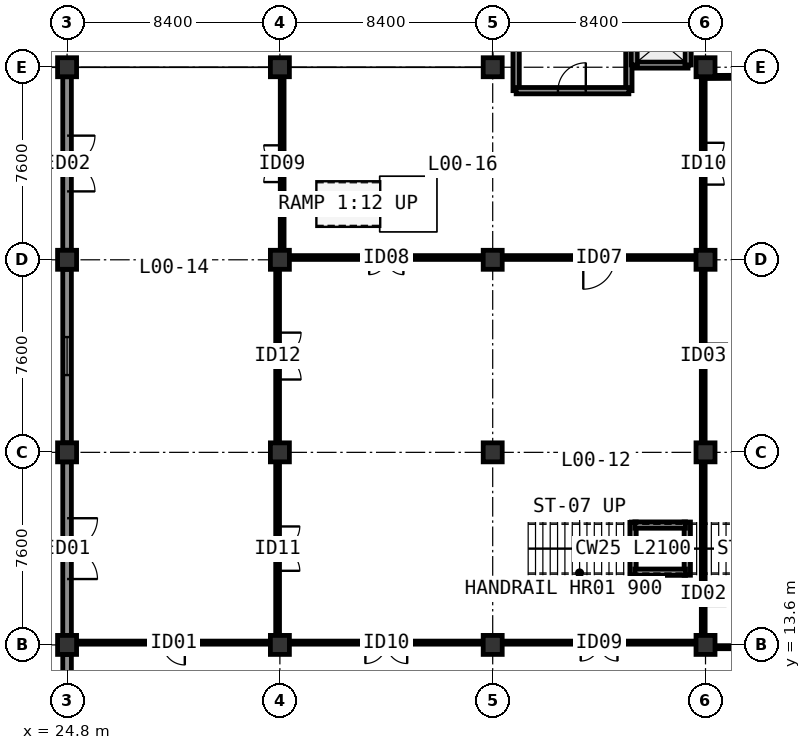
"""IFC4 building model, lengths in metres.
Left out: names, types, materials, properties, quantities, classifications, styles, units other than length and angle.
Written with IfcOpenShell. Run it as: python <this file> out.ifc"""

import sys

from ifc_helpers import new_model, si_unit, direction, frame, frame_2d, origin, origin_2d, place, context, subcontext, project, spatial, rectangle, extrude, element, fill, save


model = new_model("IFC4")
c1 = context("Model", 3, precision=1e-05, world=origin(), true_north=direction((0.0, 1.0)))
c2 = subcontext(c1, "Body", "Model", "MODEL_VIEW")
j1 = project(units=[si_unit("LENGTHUNIT", "METRE"), si_unit("PLANEANGLEUNIT", "RADIAN")], contexts=[c1])
p1 = place(None, origin())
s1 = spatial("IfcSite", under=j1, at=p1, CompositionType="ELEMENT")
p2 = place(p1, origin())
s2 = spatial("IfcBuilding", under=s1, at=p2, CompositionType="ELEMENT")
p3 = place(p2, origin())
s3 = spatial("IfcBuildingStorey", under=s2, at=p3, CompositionType="ELEMENT", Elevation=0.0)
for number, where, z_axis, x_axis in (
    (1, (24.8, 13.6, 0.0), (0.0, 0.0, 1.0), (1.0, 0.0, 0.0)),
    (2, (33.2, 13.6, 0.0), (0.0, 0.0, 1.0), (1.0, 0.0, 0.0)),
    (3, (41.6, 13.6, 0.0), (0.0, 0.0, 1.0), (1.0, 0.0, 0.0)),
    (4, (50.0, 13.6, 0.0), (0.0, 0.0, 1.0), (1.0, 0.0, 0.0)),
    (5, (24.8, 21.2, 0.0), (0.0, 0.0, 1.0), (1.0, 0.0, 0.0)),
    (6, (33.2, 21.2, 0.0), (0.0, 0.0, 1.0), (1.0, 0.0, 0.0)),
    (7, (41.6, 21.2, 0.0), (0.0, 0.0, 1.0), (1.0, 0.0, 0.0)),
    (8, (50.0, 21.2, 0.0), (0.0, 0.0, 1.0), (1.0, 0.0, 0.0)),
    (9, (24.8, 28.8, 0.0), (0.0, 0.0, 1.0), (1.0, 0.0, 0.0)),
    (10, (33.2, 28.8, 0.0), (0.0, 0.0, 1.0), (1.0, 0.0, 0.0)),
    (11, (41.6, 28.8, 0.0), (0.0, 0.0, 1.0), (1.0, 0.0, 0.0)),
    (12, (50.0, 28.8, 0.0), (0.0, 0.0, 1.0), (1.0, 0.0, 0.0)),
    (13, (24.8, 36.4, 0.0), (0.0, 0.0, 1.0), (1.0, 0.0, 0.0)),
    (14, (33.2, 36.4, 0.0), (0.0, 0.0, 1.0), (1.0, 0.0, 0.0)),
    (15, (41.6, 36.4, 0.0), (0.0, 0.0, 1.0), (1.0, 0.0, 0.0)),
    (16, (50.0, 36.4, 0.0), (0.0, 0.0, 1.0), (1.0, 0.0, 0.0)),
):
    element("IfcColumn", number, at=place(p3, frame(where, z_axis=z_axis, x_axis=x_axis)), inside=s3, PredefinedType="COLUMN", context=c2, shape_type="SweptSolid", body=[
        extrude(rectangle(XDim=0.75, YDim=0.75, at=origin_2d()), origin(), (0.0, 0.0, 1.0), 4.8),
    ])
p4 = place(p3, frame((24.8, 36.025, 0.0), z_axis=(0.0, 0.0, 1.0), x_axis=(0.0, -1.0, 0.0)))
e17 = element("IfcWall", 17, at=p4, inside=s3, PredefinedType="SOLIDWALL", context=c2, shape_type="SweptSolid", body=[
    extrude(rectangle(XDim=6.85, YDim=0.34, at=frame_2d((3.425, 0.0))), origin(), (0.0, 0.0, 1.0), 4.5),
])
p5 = place(p4, frame((2.325, 0.0, 0.0)))
e18 = element("IfcOpeningElement", 18, at=p5, cuts=e17, PredefinedType="OPENING", context=c2, shape_type="SweptSolid", body=[
    extrude(rectangle(XDim=2.2, YDim=2.4, at=frame_2d((1.1, 1.2))), frame((0.0, 0.18, 0.0), z_axis=(0.0, -1.0, 0.0), x_axis=(1.0, 0.0, 0.0)), (0.0, 0.0, 1.0), 0.36),
])
p6 = place(p3, frame((24.8, 28.425, 0.0), z_axis=(0.0, 0.0, 1.0), x_axis=(0.0, -1.0, 0.0)))
e19 = element("IfcWall", 19, at=p6, inside=s3, PredefinedType="SOLIDWALL", context=c2, shape_type="SweptSolid", body=[
    extrude(rectangle(XDim=6.85, YDim=0.34, at=frame_2d((3.425, 0.0))), origin(), (0.0, 0.0, 1.0), 4.5),
])
p7 = place(p6, frame((2.675, 0.0, 0.95)))
e20 = element("IfcOpeningElement", 20, at=p7, cuts=e19, PredefinedType="OPENING", context=c2, shape_type="SweptSolid", body=[
    extrude(rectangle(XDim=1.5, YDim=1.8, at=frame_2d((0.75, 0.9))), frame((0.0, 0.18, 0.0), z_axis=(0.0, -1.0, 0.0), x_axis=(1.0, 0.0, 0.0)), (0.0, 0.0, 1.0), 0.36),
])
p8 = place(p3, frame((24.8, 20.825, 0.0), z_axis=(0.0, 0.0, 1.0), x_axis=(0.0, -1.0, 0.0)))
e21 = element("IfcWall", 21, at=p8, inside=s3, PredefinedType="SOLIDWALL", context=c2, shape_type="SweptSolid", body=[
    extrude(rectangle(XDim=6.85, YDim=0.34, at=frame_2d((3.425, 0.0))), origin(), (0.0, 0.0, 1.0), 4.5),
])
p9 = place(p8, frame((2.225, 0.0, 0.0)))
e22 = element("IfcOpeningElement", 22, at=p9, cuts=e21, PredefinedType="OPENING", context=c2, shape_type="SweptSolid", body=[
    extrude(rectangle(XDim=2.4, YDim=2.4, at=frame_2d((1.2, 1.2))), frame((0.0, 0.18, 0.0), z_axis=(0.0, -1.0, 0.0), x_axis=(1.0, 0.0, 0.0)), (0.0, 0.0, 1.0), 0.36),
])
p10 = place(p3, frame((24.8, 13.225, 0.0), z_axis=(0.0, 0.0, 1.0), x_axis=(0.0, -1.0, 0.0)))
e23 = element("IfcWall", 23, at=p10, inside=s3, PredefinedType="SOLIDWALL", context=c2, shape_type="SweptSolid", body=[
    extrude(rectangle(XDim=6.775, YDim=0.34, at=frame_2d((3.388, 0.0))), origin(), (0.0, 0.0, 1.0), 4.5),
])
p11 = place(p10, frame((2.387, 0.0, 0.0)))
e24 = element("IfcOpeningElement", 24, at=p11, cuts=e23, PredefinedType="OPENING", context=c2, shape_type="SweptSolid", body=[
    extrude(rectangle(XDim=2.0, YDim=2.1, at=frame_2d((1.0, 1.05))), frame((0.0, 0.18, 0.0), z_axis=(0.0, -1.0, 0.0), x_axis=(1.0, 0.0, 0.0)), (0.0, 0.0, 1.0), 0.36),
])
for number, where, z_axis, x_axis in (
    (25, (42.525, 35.475, 0.0), (0.0, 0.0, 1.0), (0.0, 1.0, 0.0)),
    (26, (46.975, 35.475, 0.0), (0.0, 0.0, 1.0), (0.0, 1.0, 0.0)),
):
    element("IfcWall", number, at=place(p3, frame(where, z_axis=z_axis, x_axis=x_axis)), inside=s3, PredefinedType="SHEAR", context=c2, shape_type="SweptSolid", body=[
        extrude(rectangle(XDim=8.1, YDim=0.25, at=frame_2d((4.05, 0.0))), origin(), (0.0, 0.0, 1.0), 4.52),
    ])
p12 = place(p3, frame((42.525, 35.475, 0.0), z_axis=(0.0, 0.0, 1.0), x_axis=(1.0, 0.0, 0.0)))
e27 = element("IfcWall", 27, at=p12, inside=s3, PredefinedType="SHEAR", context=c2, shape_type="SweptSolid", body=[
    extrude(rectangle(XDim=4.45, YDim=0.25, at=frame_2d((2.225, 0.0))), origin(), (0.0, 0.0, 1.0), 4.52),
])
p13 = place(p12, frame((1.65, 0.0, 0.0)))
e28 = element("IfcOpeningElement", 28, at=p13, cuts=e27, PredefinedType="OPENING", context=c2, shape_type="SweptSolid", body=[
    extrude(rectangle(XDim=1.1, YDim=2.1, at=frame_2d((0.55, 1.05))), frame((0.0, 0.135, 0.0), z_axis=(0.0, -1.0, 0.0), x_axis=(1.0, 0.0, 0.0)), (0.0, 0.0, 1.0), 0.27),
])
p14 = place(p3, frame((47.19, 36.49, 0.0), z_axis=(0.0, 0.0, 1.0), x_axis=(1.0, 0.0, 0.0)))
e29 = element("IfcWall", 29, at=p14, inside=s3, PredefinedType="SHEAR", context=c2, shape_type="SweptSolid", body=[
    extrude(rectangle(XDim=2.12, YDim=0.25, at=frame_2d((1.06, 0.0))), origin(), (0.0, 0.0, 1.0), 4.52),
])
for number, where, z_axis, x_axis in (
    (30, (47.19, 36.49, 0.0), (0.0, 0.0, 1.0), (0.0, 1.0, 0.0)),
    (31, (49.31, 36.49, 0.0), (0.0, 0.0, 1.0), (0.0, 1.0, 0.0)),
):
    element("IfcWall", number, at=place(p3, frame(where, z_axis=z_axis, x_axis=x_axis)), inside=s3, PredefinedType="SHEAR", context=c2, shape_type="SweptSolid", body=[
        extrude(rectangle(XDim=1.82, YDim=0.25, at=frame_2d((0.91, 0.0))), origin(), (0.0, 0.0, 1.0), 4.52),
    ])
for number, where, z_axis, x_axis in (
    (32, (47.14, 16.35, 0.0), (0.0, 0.0, 1.0), (0.0, 1.0, 0.0)),
    (33, (49.28, 16.35, 0.0), (0.0, 0.0, 1.0), (0.0, 1.0, 0.0)),
):
    element("IfcWall", number, at=place(p3, frame(where, z_axis=z_axis, x_axis=x_axis)), inside=s3, PredefinedType="SHEAR", context=c2, shape_type="SweptSolid", body=[
        extrude(rectangle(XDim=2.1, YDim=0.25, at=frame_2d((1.05, 0.0))), origin(), (0.0, 0.0, 1.0), 2.21),
    ])
for number, where, z_axis, x_axis in (
    (34, (47.21, 16.47, 0.0), (0.0, 0.0, 1.0), (1.0, 0.0, 0.0)),
    (35, (47.21, 18.33, 0.0), (0.0, 0.0, 1.0), (1.0, 0.0, 0.0)),
):
    element("IfcWall", number, at=place(p3, frame(where, z_axis=z_axis, x_axis=x_axis)), inside=s3, PredefinedType="SHEAR", context=c2, shape_type="SweptSolid", body=[
        extrude(rectangle(XDim=2.0, YDim=0.25, at=frame_2d((1.0, 0.0))), origin(), (0.0, 0.0, 1.0), 2.21),
    ])
p15 = place(p3, frame((66.26, 36.09, 0.0), z_axis=(0.0, 0.0, 1.0), x_axis=(-0.999989479484, -0.004587038489, 0.0)))
e36 = element("IfcWall", 36, at=p15, inside=s3, PredefinedType="PARTITIONING", context=c2, shape_type="SweptSolid", body=[
    extrude(rectangle(XDim=16.18, YDim=0.12, at=frame_2d((8.09, 0.0))), origin(), (0.0, 0.0, 1.0), 4.5),
])
p16 = place(p15, frame((8.815, 0.0, 0.0)))
e37 = element("IfcOpeningElement", 37, at=p16, cuts=e36, PredefinedType="OPENING", context=c2, shape_type="SweptSolid", body=[
    extrude(rectangle(XDim=1.15, YDim=2.12, at=frame_2d((0.575, 1.06))), frame((0.0, 0.07, 0.0), z_axis=(0.0, -1.0, 0.0), x_axis=(1.0, 0.0, 0.0)), (0.0, 0.0, 1.0), 0.14),
])
p17 = place(p3, frame((33.29, 29.265, 0.0), z_axis=(0.0, 0.0, 1.0), x_axis=(0.0, 1.0, 0.0)))
e38 = element("IfcWall", 38, at=p17, inside=s3, PredefinedType="PARTITIONING", context=c2, shape_type="SweptSolid", body=[
    extrude(rectangle(XDim=6.655, YDim=0.15, at=frame_2d((3.328, 0.0))), origin(), (0.0, 0.0, 1.0), 4.5),
])
p18 = place(p17, frame((2.603, 0.0, 0.0)))
e39 = element("IfcOpeningElement", 39, at=p18, cuts=e38, PredefinedType="OPENING", context=c2, shape_type="SweptSolid", body=[
    extrude(rectangle(XDim=1.45, YDim=2.18, at=frame_2d((0.725, 1.09))), frame((0.0, 0.085, 0.0), z_axis=(0.0, -1.0, 0.0), x_axis=(1.0, 0.0, 0.0)), (0.0, 0.0, 1.0), 0.17),
])
p19 = place(p3, frame((49.91, 35.92, 0.0), z_axis=(0.0, 0.0, 1.0), x_axis=(-7.3370263e-05, -0.999999997308, 0.0)))
e40 = element("IfcWall", 40, at=p19, inside=s3, PredefinedType="PARTITIONING", context=c2, shape_type="SweptSolid", body=[
    extrude(rectangle(XDim=6.655, YDim=0.15, at=frame_2d((3.328, 0.0))), origin(), (0.0, 0.0, 1.0), 3.81),
])
p20 = place(p19, frame((2.502, 0.0, 0.0)))
e41 = element("IfcOpeningElement", 41, at=p20, cuts=e40, PredefinedType="OPENING", context=c2, shape_type="SweptSolid", body=[
    extrude(rectangle(XDim=1.65, YDim=2.18, at=frame_2d((0.825, 1.09))), frame((0.0, 0.085, 0.0), z_axis=(0.0, -1.0, 0.0), x_axis=(1.0, 0.0, 0.0)), (0.0, 0.0, 1.0), 0.17),
])
p21 = place(p3, frame((33.11, 20.735, 0.0), z_axis=(0.0, 0.0, 1.0), x_axis=(0.0, -1.0, 0.0)))
e42 = element("IfcWall", 42, at=p21, inside=s3, PredefinedType="PARTITIONING", context=c2, shape_type="SweptSolid", body=[
    extrude(rectangle(XDim=6.67, YDim=0.15, at=frame_2d((3.335, 0.0))), origin(), (0.0, 0.0, 1.0), 3.81),
])
p22 = place(p21, frame((2.46, 0.0, 0.0)))
e43 = element("IfcOpeningElement", 43, at=p22, cuts=e42, PredefinedType="OPENING", context=c2, shape_type="SweptSolid", body=[
    extrude(rectangle(XDim=1.75, YDim=2.22, at=frame_2d((0.875, 1.11))), frame((0.0, 0.085, 0.0), z_axis=(0.0, -1.0, 0.0), x_axis=(1.0, 0.0, 0.0)), (0.0, 0.0, 1.0), 0.17),
])
p23 = place(p3, frame((33.11, 28.335, 0.0), z_axis=(0.0, 0.0, 1.0), x_axis=(0.0, -1.0, 0.0)))
e44 = element("IfcWall", 44, at=p23, inside=s3, PredefinedType="PARTITIONING", context=c2, shape_type="SweptSolid", body=[
    extrude(rectangle(XDim=6.67, YDim=0.15, at=frame_2d((3.335, 0.0))), origin(), (0.0, 0.0, 1.0), 3.81),
])
p24 = place(p23, frame((2.41, 0.0, 0.0)))
e45 = element("IfcOpeningElement", 45, at=p24, cuts=e44, PredefinedType="OPENING", context=c2, shape_type="SweptSolid", body=[
    extrude(rectangle(XDim=1.85, YDim=2.22, at=frame_2d((0.925, 1.11))), frame((0.0, 0.085, 0.0), z_axis=(0.0, -1.0, 0.0), x_axis=(1.0, 0.0, 0.0)), (0.0, 0.0, 1.0), 0.17),
])
p25 = place(p3, frame((32.735, 13.69, 0.0), z_axis=(0.0, 0.0, 1.0), x_axis=(-1.0, 0.0, 0.0)))
e46 = element("IfcWall", 46, at=p25, inside=s3, PredefinedType="PARTITIONING", context=c2, shape_type="SweptSolid", body=[
    extrude(rectangle(XDim=7.455, YDim=0.12, at=frame_2d((3.728, 0.0))), origin(), (0.0, 0.0, 1.0), 4.5),
])
p26 = place(p25, frame((3.288, 0.0, 0.0)))
e47 = element("IfcOpeningElement", 47, at=p26, cuts=e46, PredefinedType="OPENING", context=c2, shape_type="SweptSolid", body=[
    extrude(rectangle(XDim=0.88, YDim=2.08, at=frame_2d((0.44, 1.04))), frame((0.0, 0.07, 0.0), z_axis=(0.0, -1.0, 0.0), x_axis=(1.0, 0.0, 0.0)), (0.0, 0.0, 1.0), 0.14),
])
p27 = place(p3, frame((49.91, 20.735, 0.0), z_axis=(0.0, 0.0, 1.0), x_axis=(0.0, -1.0, 0.0)))
e48 = element("IfcWall", 48, at=p27, inside=s3, PredefinedType="PARTITIONING", context=c2, shape_type="SweptSolid", body=[
    extrude(rectangle(XDim=6.67, YDim=0.15, at=frame_2d((3.335, 0.0))), origin(), (0.0, 0.0, 1.0), 4.5),
])
p28 = place(p27, frame((4.675, 0.0, 0.0)))
e49 = element("IfcOpeningElement", 49, at=p28, cuts=e48, PredefinedType="OPENING", context=c2, shape_type="SweptSolid", body=[
    extrude(rectangle(XDim=0.92, YDim=2.08, at=frame_2d((0.46, 1.04))), frame((0.0, 0.085, 0.0), z_axis=(0.0, -1.0, 0.0), x_axis=(1.0, 0.0, 0.0)), (0.0, 0.0, 1.0), 0.17),
])
p29 = place(p3, frame((49.91, 28.335, 0.0), z_axis=(0.0, 0.0, 1.0), x_axis=(0.0, -1.0, 0.0)))
e50 = element("IfcWall", 50, at=p29, inside=s3, PredefinedType="PARTITIONING", context=c2, shape_type="SweptSolid", body=[
    extrude(rectangle(XDim=6.67, YDim=0.15, at=frame_2d((3.335, 0.0))), origin(), (0.0, 0.0, 1.0), 4.5),
])
p30 = place(p29, frame((2.845, 0.0, 0.0)))
e51 = element("IfcOpeningElement", 51, at=p30, cuts=e50, PredefinedType="OPENING", context=c2, shape_type="SweptSolid", body=[
    extrude(rectangle(XDim=0.98, YDim=2.08, at=frame_2d((0.49, 1.04))), frame((0.0, 0.085, 0.0), z_axis=(0.0, -1.0, 0.0), x_axis=(1.0, 0.0, 0.0)), (0.0, 0.0, 1.0), 0.17),
])
p31 = place(p3, frame((50.465, 13.51, 0.0), z_axis=(0.0, 0.0, 1.0), x_axis=(1.0, 0.0, 0.0)))
e52 = element("IfcWall", 52, at=p31, inside=s3, PredefinedType="PARTITIONING", context=c2, shape_type="SweptSolid", body=[
    extrude(rectangle(XDim=7.47, YDim=0.12, at=frame_2d((3.735, 0.0))), origin(), (0.0, 0.0, 1.0), 3.81),
])
p32 = place(p31, frame((3.225, 0.0, 0.0)))
e53 = element("IfcOpeningElement", 53, at=p32, cuts=e52, PredefinedType="OPENING", context=c2, shape_type="SweptSolid", body=[
    extrude(rectangle(XDim=1.02, YDim=2.12, at=frame_2d((0.51, 1.06))), frame((0.0, 0.07, 0.0), z_axis=(0.0, -1.0, 0.0), x_axis=(1.0, 0.0, 0.0)), (0.0, 0.0, 1.0), 0.14),
])
p33 = place(p3, frame((49.535, 28.89, 0.0), z_axis=(0.0, 0.0, 1.0), x_axis=(-1.0, 0.0, 0.0)))
e54 = element("IfcWall", 54, at=p33, inside=s3, PredefinedType="PARTITIONING", context=c2, shape_type="SweptSolid", body=[
    extrude(rectangle(XDim=7.47, YDim=0.15, at=frame_2d((3.735, 0.0))), origin(), (0.0, 0.0, 1.0), 3.81),
])
p34 = place(p33, frame((3.11, 0.0, 0.0)))
e55 = element("IfcOpeningElement", 55, at=p34, cuts=e54, PredefinedType="OPENING", context=c2, shape_type="SweptSolid", body=[
    extrude(rectangle(XDim=1.25, YDim=2.12, at=frame_2d((0.625, 1.06))), frame((0.0, 0.085, 0.0), z_axis=(0.0, -1.0, 0.0), x_axis=(1.0, 0.0, 0.0)), (0.0, 0.0, 1.0), 0.17),
])
p35 = place(p3, frame((41.135, 28.89, 0.0), z_axis=(0.0, 0.0, 1.0), x_axis=(-1.0, 0.0, 0.0)))
e56 = element("IfcWall", 56, at=p35, inside=s3, PredefinedType="PARTITIONING", context=c2, shape_type="SweptSolid", body=[
    extrude(rectangle(XDim=7.47, YDim=0.15, at=frame_2d((3.735, 0.0))), origin(), (0.0, 0.0, 1.0), 4.047),
])
p36 = place(p35, frame((3.06, 0.0, 0.0)))
e57 = element("IfcOpeningElement", 57, at=p36, cuts=e56, PredefinedType="OPENING", context=c2, shape_type="SweptSolid", body=[
    extrude(rectangle(XDim=1.35, YDim=2.18, at=frame_2d((0.675, 1.09))), frame((0.0, 0.085, 0.0), z_axis=(0.0, -1.0, 0.0), x_axis=(1.0, 0.0, 0.0)), (0.0, 0.0, 1.0), 0.17),
])
p37 = place(p3, frame((49.535, 13.69, 0.0), z_axis=(0.0, 0.0, 1.0), x_axis=(-1.0, 0.0, 0.0)))
e58 = element("IfcWall", 58, at=p37, inside=s3, PredefinedType="PARTITIONING", context=c2, shape_type="SweptSolid", body=[
    extrude(rectangle(XDim=7.47, YDim=0.12, at=frame_2d((3.735, 0.0))), origin(), (0.0, 0.0, 1.0), 3.81),
])
p38 = place(p37, frame((3.01, 0.0, 0.0)))
e59 = element("IfcOpeningElement", 59, at=p38, cuts=e58, PredefinedType="OPENING", context=c2, shape_type="SweptSolid", body=[
    extrude(rectangle(XDim=1.45, YDim=2.18, at=frame_2d((0.725, 1.09))), frame((0.0, 0.07, 0.0), z_axis=(0.0, -1.0, 0.0), x_axis=(1.0, 0.0, 0.0)), (0.0, 0.0, 1.0), 0.14),
])
p39 = place(p3, frame((41.135, 13.69, 0.0), z_axis=(0.0, 0.0, 1.0), x_axis=(-1.0, 0.0, 0.0)))
e60 = element("IfcWall", 60, at=p39, inside=s3, PredefinedType="PARTITIONING", context=c2, shape_type="SweptSolid", body=[
    extrude(rectangle(XDim=7.47, YDim=0.12, at=frame_2d((3.735, 0.0))), origin(), (0.0, 0.0, 1.0), 3.81),
])
p40 = place(p39, frame((2.91, 0.0, 0.0)))
e61 = element("IfcOpeningElement", 61, at=p40, cuts=e60, PredefinedType="OPENING", context=c2, shape_type="SweptSolid", body=[
    extrude(rectangle(XDim=1.65, YDim=2.18, at=frame_2d((0.825, 1.09))), frame((0.0, 0.07, 0.0), z_axis=(0.0, -1.0, 0.0), x_axis=(1.0, 0.0, 0.0)), (0.0, 0.0, 1.0), 0.14),
])
p41 = place(p5, frame((2.2, 0.0, 0.0), z_axis=(0.0, 0.0, 1.0), x_axis=(-1.0, 0.0, 0.0)))
e62 = element("IfcDoor", 62, at=p41, inside=s3, OperationType="DOUBLE_DOOR_SINGLE_SWING", PredefinedType="DOOR", context=c2, shape_type="SweptSolid", body=[
    extrude(rectangle(XDim=2.2, YDim=2.4, at=frame_2d((1.1, 1.2))), frame((0.0, 0.025, 0.0), z_axis=(0.0, -1.0, 0.0), x_axis=(1.0, 0.0, 0.0)), (0.0, 0.0, 1.0), 0.05),
])
fill(e18, e62)
p42 = place(p7, origin())
e63 = element("IfcWindow", 63, at=p42, inside=s3, PartitioningType="SINGLE_PANEL", PredefinedType="WINDOW", context=c2, shape_type="SweptSolid", body=[
    extrude(rectangle(XDim=1.5, YDim=1.8, at=frame_2d((0.75, 0.9))), frame((0.0, 0.03, 0.0), z_axis=(0.0, -1.0, 0.0), x_axis=(1.0, 0.0, 0.0)), (0.0, 0.0, 1.0), 0.06),
])
fill(e20, e63)
p43 = place(p9, frame((2.4, 0.0, 0.0), z_axis=(0.0, 0.0, 1.0), x_axis=(-1.0, 0.0, 0.0)))
e64 = element("IfcDoor", 64, at=p43, inside=s3, OperationType="DOUBLE_DOOR_SINGLE_SWING", PredefinedType="DOOR", context=c2, shape_type="SweptSolid", body=[
    extrude(rectangle(XDim=2.4, YDim=2.4, at=frame_2d((1.2, 1.2))), frame((0.0, 0.025, 0.0), z_axis=(0.0, -1.0, 0.0), x_axis=(1.0, 0.0, 0.0)), (0.0, 0.0, 1.0), 0.05),
])
fill(e22, e64)
p44 = place(p13, frame((1.1, 0.0, 0.0), z_axis=(0.0, 0.0, 1.0), x_axis=(-1.0, 0.0, 0.0)))
e65 = element("IfcDoor", 65, at=p44, inside=s3, OperationType="SINGLE_SWING_RIGHT", PredefinedType="DOOR", context=c2, shape_type="SweptSolid", body=[
    extrude(rectangle(XDim=1.1, YDim=2.1, at=frame_2d((0.55, 1.05))), frame((0.0, 0.025, 0.0), z_axis=(0.0, -1.0, 0.0), x_axis=(1.0, 0.0, 0.0)), (0.0, 0.0, 1.0), 0.05),
])
fill(e28, e65)
p45 = place(p18, origin())
e66 = element("IfcDoor", 66, at=p45, inside=s3, OperationType="DOUBLE_DOOR_SINGLE_SWING", PredefinedType="DOOR", context=c2, shape_type="SweptSolid", body=[
    extrude(rectangle(XDim=1.45, YDim=2.18, at=frame_2d((0.725, 1.09))), frame((0.0, 0.025, 0.0), z_axis=(0.0, -1.0, 0.0), x_axis=(1.0, 0.0, 0.0)), (0.0, 0.0, 1.0), 0.05),
])
fill(e39, e66)
p46 = place(p20, origin())
e67 = element("IfcDoor", 67, at=p46, inside=s3, OperationType="DOUBLE_DOOR_SINGLE_SWING", PredefinedType="DOOR", context=c2, shape_type="SweptSolid", body=[
    extrude(rectangle(XDim=1.65, YDim=2.18, at=frame_2d((0.825, 1.09))), frame((0.0, 0.025, 0.0), z_axis=(0.0, -1.0, 0.0), x_axis=(1.0, 0.0, 0.0)), (0.0, 0.0, 1.0), 0.05),
])
fill(e41, e67)
p47 = place(p22, origin())
e68 = element("IfcDoor", 68, at=p47, inside=s3, OperationType="DOUBLE_DOOR_SINGLE_SWING", PredefinedType="DOOR", context=c2, shape_type="SweptSolid", body=[
    extrude(rectangle(XDim=1.75, YDim=2.22, at=frame_2d((0.875, 1.11))), frame((0.0, 0.025, 0.0), z_axis=(0.0, -1.0, 0.0), x_axis=(1.0, 0.0, 0.0)), (0.0, 0.0, 1.0), 0.05),
])
fill(e43, e68)
p48 = place(p24, origin())
e69 = element("IfcDoor", 69, at=p48, inside=s3, OperationType="DOUBLE_DOOR_SINGLE_SWING", PredefinedType="DOOR", context=c2, shape_type="SweptSolid", body=[
    extrude(rectangle(XDim=1.85, YDim=2.22, at=frame_2d((0.925, 1.11))), frame((0.0, 0.025, 0.0), z_axis=(0.0, -1.0, 0.0), x_axis=(1.0, 0.0, 0.0)), (0.0, 0.0, 1.0), 0.05),
])
fill(e45, e69)
p49 = place(p26, origin())
e70 = element("IfcDoor", 70, at=p49, inside=s3, OperationType="SINGLE_SWING_LEFT", PredefinedType="DOOR", context=c2, shape_type="SweptSolid", body=[
    extrude(rectangle(XDim=0.88, YDim=2.08, at=frame_2d((0.44, 1.04))), frame((0.0, 0.025, 0.0), z_axis=(0.0, -1.0, 0.0), x_axis=(1.0, 0.0, 0.0)), (0.0, 0.0, 1.0), 0.05),
])
fill(e47, e70)
p50 = place(p28, origin())
e71 = element("IfcDoor", 71, at=p50, inside=s3, OperationType="SINGLE_SWING_RIGHT", PredefinedType="DOOR", context=c2, shape_type="SweptSolid", body=[
    extrude(rectangle(XDim=0.92, YDim=2.08, at=frame_2d((0.46, 1.04))), frame((0.0, 0.025, 0.0), z_axis=(0.0, -1.0, 0.0), x_axis=(1.0, 0.0, 0.0)), (0.0, 0.0, 1.0), 0.05),
])
fill(e49, e71)
p51 = place(p30, origin())
e72 = element("IfcDoor", 72, at=p51, inside=s3, OperationType="SINGLE_SWING_LEFT", PredefinedType="DOOR", context=c2, shape_type="SweptSolid", body=[
    extrude(rectangle(XDim=0.98, YDim=2.08, at=frame_2d((0.49, 1.04))), frame((0.0, 0.025, 0.0), z_axis=(0.0, -1.0, 0.0), x_axis=(1.0, 0.0, 0.0)), (0.0, 0.0, 1.0), 0.05),
])
fill(e51, e72)
p52 = place(p34, origin())
e73 = element("IfcDoor", 73, at=p52, inside=s3, OperationType="SINGLE_SWING_RIGHT", PredefinedType="DOOR", context=c2, shape_type="SweptSolid", body=[
    extrude(rectangle(XDim=1.25, YDim=2.12, at=frame_2d((0.625, 1.06))), frame((0.0, 0.025, 0.0), z_axis=(0.0, -1.0, 0.0), x_axis=(1.0, 0.0, 0.0)), (0.0, 0.0, 1.0), 0.05),
])
fill(e55, e73)
p53 = place(p36, origin())
e74 = element("IfcDoor", 74, at=p53, inside=s3, OperationType="DOUBLE_DOOR_SINGLE_SWING", PredefinedType="DOOR", context=c2, shape_type="SweptSolid", body=[
    extrude(rectangle(XDim=1.35, YDim=2.18, at=frame_2d((0.675, 1.09))), frame((0.0, 0.025, 0.0), z_axis=(0.0, -1.0, 0.0), x_axis=(1.0, 0.0, 0.0)), (0.0, 0.0, 1.0), 0.05),
])
fill(e57, e74)
p54 = place(p38, origin())
e75 = element("IfcDoor", 75, at=p54, inside=s3, OperationType="DOUBLE_DOOR_SINGLE_SWING", PredefinedType="DOOR", context=c2, shape_type="SweptSolid", body=[
    extrude(rectangle(XDim=1.45, YDim=2.18, at=frame_2d((0.725, 1.09))), frame((0.0, 0.025, 0.0), z_axis=(0.0, -1.0, 0.0), x_axis=(1.0, 0.0, 0.0)), (0.0, 0.0, 1.0), 0.05),
])
fill(e59, e75)
p55 = place(p40, origin())
e76 = element("IfcDoor", 76, at=p55, inside=s3, OperationType="DOUBLE_DOOR_SINGLE_SWING", PredefinedType="DOOR", context=c2, shape_type="SweptSolid", body=[
    extrude(rectangle(XDim=1.65, YDim=2.18, at=frame_2d((0.825, 1.09))), frame((0.0, 0.025, 0.0), z_axis=(0.0, -1.0, 0.0), x_axis=(1.0, 0.0, 0.0)), (0.0, 0.0, 1.0), 0.05),
])
fill(e61, e76)
save(model, sys.argv[1])
